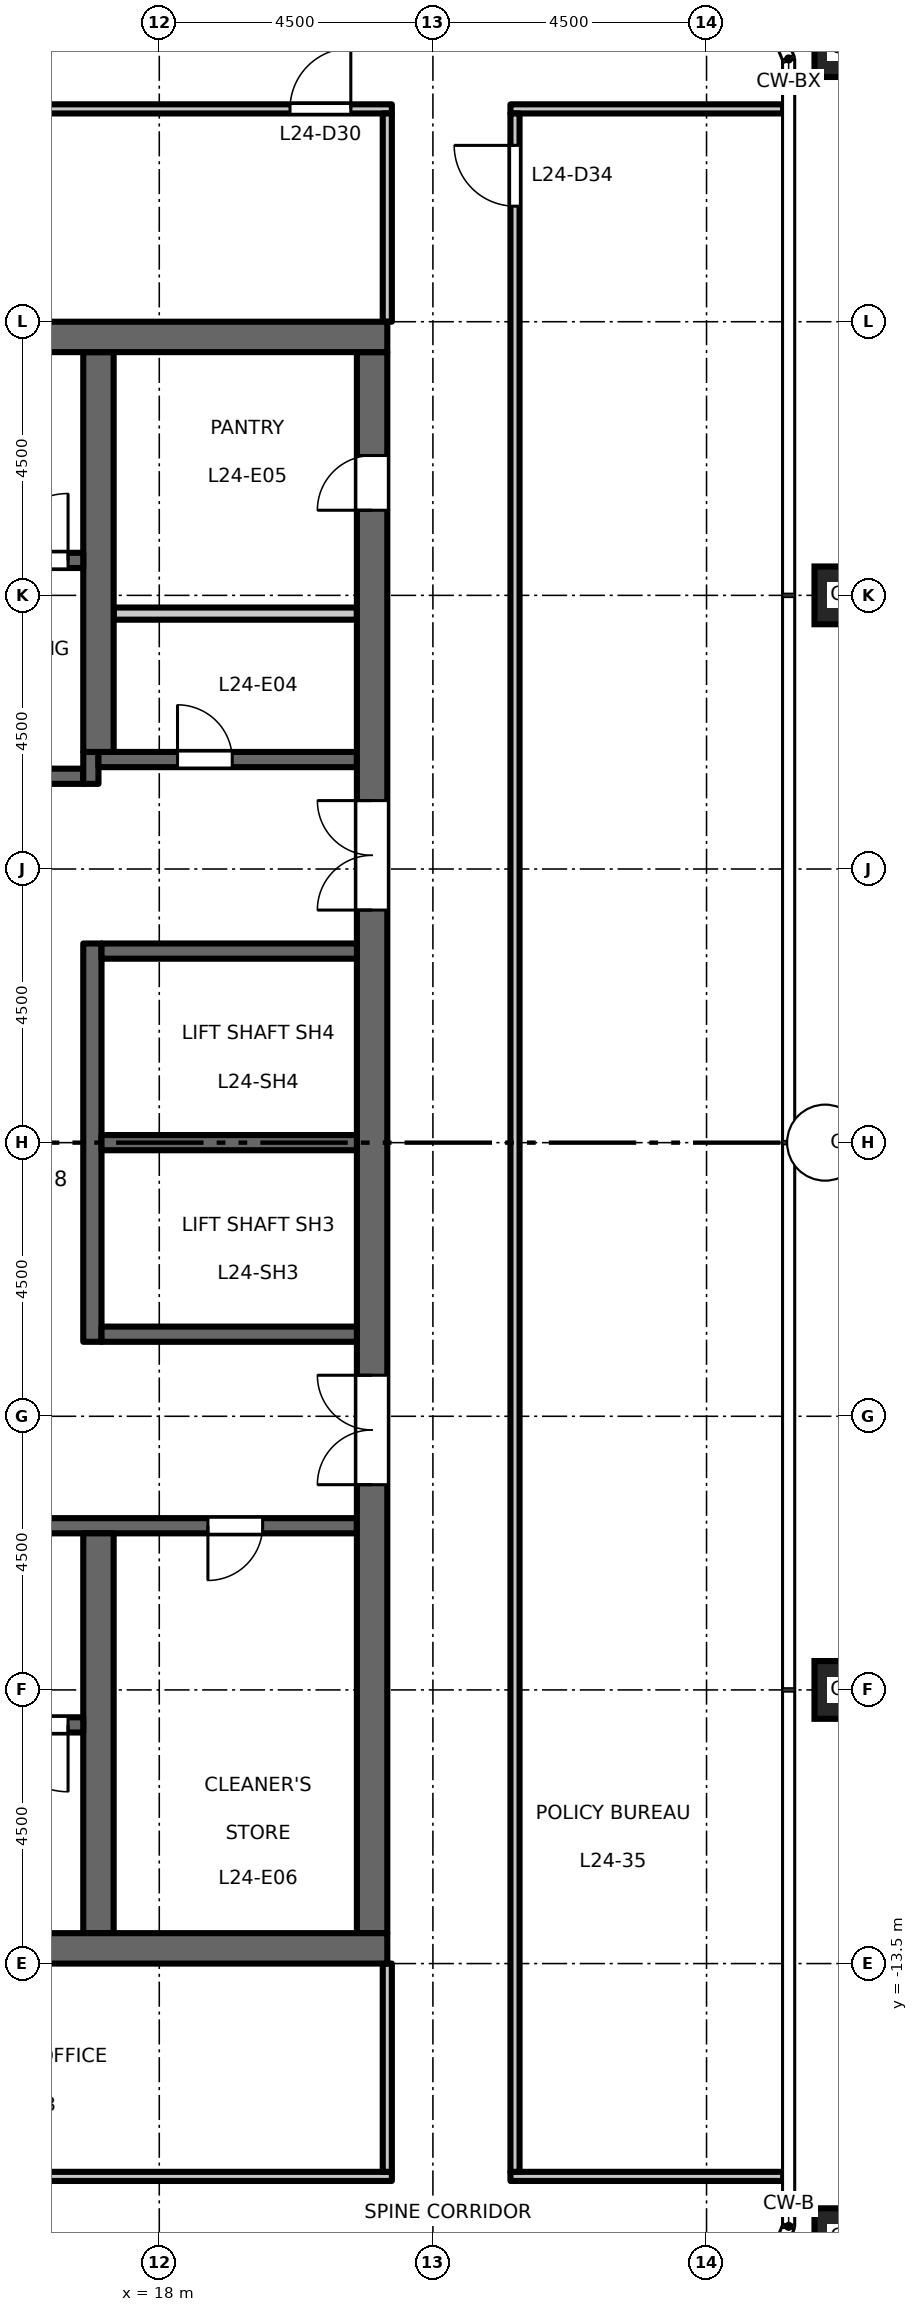
"""IFC4 building model, lengths in metres.
Left out: names, types, materials, properties, quantities, classifications, styles, units other than length and angle.
Written with IfcOpenShell. Run it as: python <this file> out.ifc"""

import sys

from ifc_helpers import new_model, si_unit, direction, frame, frame_2d, origin, origin_2d, place, context, subcontext, project, spatial, rectangle, hollow_rectangle, extrude, element, fill, save


model = new_model("IFC4")
c1 = context("Model", 3, precision=1e-05, world=origin(), true_north=direction((0.0, 1.0)))
c2 = subcontext(c1, "Body", "Model", "MODEL_VIEW")
j1 = project(units=[si_unit("LENGTHUNIT", "METRE"), si_unit("PLANEANGLEUNIT", "RADIAN")], contexts=[c1])
p1 = place(None, origin())
s1 = spatial("IfcSite", under=j1, at=p1, CompositionType="ELEMENT")
p2 = place(p1, origin())
s2 = spatial("IfcBuilding", under=s1, at=p2, CompositionType="ELEMENT")
p3 = place(p2, frame((0.0, 0.0, 113.7)))
s3 = spatial("IfcBuildingStorey", under=s2, at=p3, CompositionType="ELEMENT", Elevation=113.7)
for number, where, z_axis, x_axis in (
    (1, (29.25, -18.0, 0.0), (0.0, 0.0, 1.0), (1.0, 0.0, 0.0)),
    (2, (29.25, -9.0, 0.0), (0.0, 0.0, 1.0), (1.0, 0.0, 0.0)),
    (3, (29.25, 0.0, 0.0), (0.0, 0.0, 1.0), (1.0, 0.0, 0.0)),
    (4, (29.25, 9.0, 0.0), (0.0, 0.0, 1.0), (1.0, 0.0, 0.0)),
    (5, (29.25, 18.0, 0.0), (0.0, 0.0, 1.0), (1.0, 0.0, 0.0)),
):
    element("IfcColumn", number, at=place(p3, frame(where, z_axis=z_axis, x_axis=x_axis)), inside=s3, PredefinedType="COLUMN", context=c2, shape_type="SweptSolid", body=[
        extrude(hollow_rectangle(XDim=0.95, YDim=0.95, WallThickness=0.055, at=origin_2d()), origin(), (0.0, 0.0, 1.0), 4.5),
    ])
p4 = place(p3, frame((12.15, 6.025, 0.0), z_axis=(0.0, 0.0, 1.0), x_axis=(1.0, 0.0, 0.0)))
e6 = element("IfcWall", 6, at=p4, inside=s3, PredefinedType="SHEAR", context=c2, shape_type="SweptSolid", body=[
    extrude(rectangle(XDim=4.6, YDim=0.25, at=frame_2d((2.3, 0.0))), origin(), (0.0, 0.0, 1.0), 4.35),
])
p5 = place(p4, frame((1.8, 0.0, 0.0)))
e7 = element("IfcOpeningElement", 7, at=p5, cuts=e6, PredefinedType="OPENING", context=c2, shape_type="SweptSolid", body=[
    extrude(rectangle(XDim=1.0, YDim=2.1, at=frame_2d((0.5, 1.05))), frame((0.0, 0.135, 0.0), z_axis=(0.0, -1.0, 0.0), x_axis=(1.0, 0.0, 0.0)), (0.0, 0.0, 1.0), 0.27),
])
p6 = place(p3, frame((16.875, 5.9, 0.0), z_axis=(0.0, 0.0, 1.0), x_axis=(0.0, 1.0, 0.0)))
e8 = element("IfcWall", 8, at=p6, inside=s3, PredefinedType="SHEAR", context=c2, shape_type="SweptSolid", body=[
    extrude(rectangle(XDim=0.525, YDim=0.25, at=frame_2d((0.263, 0.0))), origin(), (0.0, 0.0, 1.0), 4.35),
])
p7 = place(p3, frame((17.0, 6.3, 0.0), z_axis=(0.0, 0.0, 1.0), x_axis=(1.0, 0.0, 0.0)))
e9 = element("IfcWall", 9, at=p7, inside=s3, PredefinedType="SHEAR", context=c2, shape_type="SweptSolid", body=[
    extrude(rectangle(XDim=4.25, YDim=0.25, at=frame_2d((2.125, 0.0))), origin(), (0.0, 0.0, 1.0), 4.35),
])
p8 = place(p7, frame((1.3, 0.0, 0.0)))
e10 = element("IfcOpeningElement", 10, at=p8, cuts=e9, PredefinedType="OPENING", context=c2, shape_type="SweptSolid", body=[
    extrude(rectangle(XDim=0.9, YDim=2.1, at=frame_2d((0.45, 1.05))), frame((0.0, 0.135, 0.0), z_axis=(0.0, -1.0, 0.0), x_axis=(1.0, 0.0, 0.0)), (0.0, 0.0, 1.0), 0.27),
])
p9 = place(p3, frame((12.15, -6.3, 0.0), z_axis=(0.0, 0.0, 1.0), x_axis=(1.0, 0.0, 0.0)))
e11 = element("IfcWall", 11, at=p9, inside=s3, PredefinedType="SHEAR", context=c2, shape_type="SweptSolid", body=[
    extrude(rectangle(XDim=9.1, YDim=0.25, at=frame_2d((4.55, 0.0))), origin(), (0.0, 0.0, 1.0), 4.35),
])
p10 = place(p9, frame((1.8, 0.0, 0.0)))
e12 = element("IfcOpeningElement", 12, at=p10, cuts=e11, PredefinedType="OPENING", context=c2, shape_type="SweptSolid", body=[
    extrude(rectangle(XDim=1.0, YDim=2.1, at=frame_2d((0.5, 1.05))), frame((0.0, 0.135, 0.0), z_axis=(0.0, -1.0, 0.0), x_axis=(1.0, 0.0, 0.0)), (0.0, 0.0, 1.0), 0.27),
])
p11 = place(p9, frame((6.65, 0.0, 0.0)))
e13 = element("IfcOpeningElement", 13, at=p11, cuts=e11, PredefinedType="OPENING", context=c2, shape_type="SweptSolid", body=[
    extrude(rectangle(XDim=0.9, YDim=2.1, at=frame_2d((0.45, 1.05))), frame((0.0, 0.135, 0.0), z_axis=(0.0, -1.0, 0.0), x_axis=(1.0, 0.0, 0.0)), (0.0, 0.0, 1.0), 0.27),
])
p12 = place(p3, frame((21.5, -13.0, 0.0), z_axis=(0.0, 0.0, 1.0), x_axis=(0.0, 1.0, 0.0)))
e14 = element("IfcWall", 14, at=p12, inside=s3, PredefinedType="SHEAR", context=c2, shape_type="SweptSolid", body=[
    extrude(rectangle(XDim=26.0, YDim=0.5, at=frame_2d((13.0, 0.0))), origin(), (0.0, 0.0, 1.0), 4.35),
])
p13 = place(p12, frame((16.825, 0.0, 0.0)))
e15 = element("IfcOpeningElement", 15, at=p13, cuts=e14, PredefinedType="OPENING", context=c2, shape_type="SweptSolid", body=[
    extrude(rectangle(XDim=1.8, YDim=2.1, at=frame_2d((0.9, 1.05))), frame((0.0, 0.26, 0.0), z_axis=(0.0, -1.0, 0.0), x_axis=(1.0, 0.0, 0.0)), (0.0, 0.0, 1.0), 0.52),
])
p14 = place(p12, frame((7.375, 0.0, 0.0)))
e16 = element("IfcOpeningElement", 16, at=p14, cuts=e14, PredefinedType="OPENING", context=c2, shape_type="SweptSolid", body=[
    extrude(rectangle(XDim=1.8, YDim=2.1, at=frame_2d((0.9, 1.05))), frame((0.0, 0.26, 0.0), z_axis=(0.0, -1.0, 0.0), x_axis=(1.0, 0.0, 0.0)), (0.0, 0.0, 1.0), 0.52),
])
p15 = place(p12, frame((23.4, 0.0, 0.0)))
e17 = element("IfcOpeningElement", 17, at=p15, cuts=e14, PredefinedType="OPENING", context=c2, shape_type="SweptSolid", body=[
    extrude(rectangle(XDim=0.9, YDim=2.1, at=frame_2d((0.45, 1.05))), frame((0.0, 0.26, 0.0), z_axis=(0.0, -1.0, 0.0), x_axis=(1.0, 0.0, 0.0)), (0.0, 0.0, 1.0), 0.52),
])
p16 = place(p3, frame((17.25, 8.7, 0.0), z_axis=(0.0, 0.0, 1.0), x_axis=(1.0, 0.0, 0.0)))
e18 = element("IfcWall", 18, at=p16, inside=s3, PredefinedType="PARTITIONING", context=c2, shape_type="SweptSolid", body=[
    extrude(rectangle(XDim=4.0, YDim=0.2, at=frame_2d((2.0, 0.0))), origin(), (0.0, 0.0, 1.0), 4.35),
])
p17 = place(p3, frame((16.9, -3.275, 0.0), z_axis=(0.0, 0.0, 1.0), x_axis=(0.0, 1.0, 0.0)))
e19 = element("IfcWall", 19, at=p17, inside=s3, PredefinedType="SHEAR", context=c2, shape_type="SweptSolid", body=[
    extrude(rectangle(XDim=6.55, YDim=0.3, at=frame_2d((3.275, 0.0))), origin(), (0.0, 0.0, 1.0), 4.35),
])
for number, where, z_axis, x_axis in (
    (20, (17.05, 0.0, 0.0), (0.0, 0.0, 1.0), (1.0, 0.0, 0.0)),
    (21, (17.05, 3.15, 0.0), (0.0, 0.0, 1.0), (1.0, 0.0, 0.0)),
    (22, (17.05, -3.15, 0.0), (0.0, 0.0, 1.0), (1.0, 0.0, 0.0)),
):
    element("IfcWall", number, at=place(p3, frame(where, z_axis=z_axis, x_axis=x_axis)), inside=s3, PredefinedType="SHEAR", context=c2, shape_type="SweptSolid", body=[
        extrude(rectangle(XDim=4.2, YDim=0.25, at=frame_2d((2.1, 0.0))), origin(), (0.0, 0.0, 1.0), 4.35),
    ])
for number, where, z_axis, x_axis in (
    (23, (17.0, 6.425, 0.0), (0.0, 0.0, 1.0), (0.0, 1.0, 0.0)),
    (24, (17.0, -13.0, 0.0), (0.0, 0.0, 1.0), (0.0, 1.0, 0.0)),
):
    element("IfcWall", number, at=place(p3, frame(where, z_axis=z_axis, x_axis=x_axis)), inside=s3, PredefinedType="SHEAR", context=c2, shape_type="SweptSolid", body=[
        extrude(rectangle(XDim=6.575, YDim=0.5, at=frame_2d((3.288, 0.0))), origin(), (0.0, 0.0, 1.0), 4.35),
    ])
p18 = place(p3, frame((8.75, 9.575, 0.0), z_axis=(0.0, 0.0, 1.0), x_axis=(1.0, 0.0, 0.0)))
e25 = element("IfcWall", 25, at=p18, inside=s3, PredefinedType="SHEAR", context=c2, shape_type="SweptSolid", body=[
    extrude(rectangle(XDim=8.0, YDim=0.25, at=frame_2d((4.0, 0.0))), origin(), (0.0, 0.0, 1.0), 4.35),
])
p19 = place(p18, frame((6.65, 0.0, 0.0)))
e26 = element("IfcOpeningElement", 26, at=p19, cuts=e25, PredefinedType="OPENING", context=c2, shape_type="SweptSolid", body=[
    extrude(rectangle(XDim=1.1, YDim=2.1, at=frame_2d((0.55, 1.05))), frame((0.0, 0.135, 0.0), z_axis=(0.0, -1.0, 0.0), x_axis=(1.0, 0.0, 0.0)), (0.0, 0.0, 1.0), 0.27),
])
p20 = place(p3, frame((8.75, -9.575, 0.0), z_axis=(0.0, 0.0, 1.0), x_axis=(1.0, 0.0, 0.0)))
e27 = element("IfcWall", 27, at=p20, inside=s3, PredefinedType="SHEAR", context=c2, shape_type="SweptSolid", body=[
    extrude(rectangle(XDim=8.0, YDim=0.25, at=frame_2d((4.0, 0.0))), origin(), (0.0, 0.0, 1.0), 4.35),
])
p21 = place(p20, frame((6.65, 0.0, 0.0)))
e28 = element("IfcOpeningElement", 28, at=p21, cuts=e27, PredefinedType="OPENING", context=c2, shape_type="SweptSolid", body=[
    extrude(rectangle(XDim=1.1, YDim=2.1, at=frame_2d((0.55, 1.05))), frame((0.0, 0.135, 0.0), z_axis=(0.0, -1.0, 0.0), x_axis=(1.0, 0.0, 0.0)), (0.0, 0.0, 1.0), 0.27),
])
for number, where, z_axis, x_axis in (
    (29, (8.25, 13.25, 0.0), (0.0, 0.0, 1.0), (1.0, 0.0, 0.0)),
    (30, (8.25, -13.25, 0.0), (0.0, 0.0, 1.0), (1.0, 0.0, 0.0)),
):
    element("IfcWall", number, at=place(p3, frame(where, z_axis=z_axis, x_axis=x_axis)), inside=s3, PredefinedType="SHEAR", context=c2, shape_type="SweptSolid", body=[
        extrude(rectangle(XDim=13.5, YDim=0.5, at=frame_2d((6.75, 0.0))), origin(), (0.0, 0.0, 1.0), 4.35),
    ])
p22 = place(p3, frame((-21.825, -17.0, 0.0), z_axis=(0.0, 0.0, 1.0), x_axis=(1.0, 0.0, 0.0)))
e31 = element("IfcWall", 31, at=p22, inside=s3, PredefinedType="PARTITIONING", context=c2, shape_type="SweptSolid", body=[
    extrude(rectangle(XDim=43.65, YDim=0.15, at=frame_2d((21.825, 0.0))), origin(), (0.0, 0.0, 1.0), 4.35),
])
p23 = place(p22, frame((14.175, 0.0, 0.0)))
e32 = element("IfcOpeningElement", 32, at=p23, cuts=e31, PredefinedType="OPENING", context=c2, shape_type="SweptSolid", body=[
    extrude(rectangle(XDim=1.0, YDim=2.1, at=frame_2d((0.5, 1.05))), frame((0.0, 0.085, 0.0), z_axis=(0.0, -1.0, 0.0), x_axis=(1.0, 0.0, 0.0)), (0.0, 0.0, 1.0), 0.17),
])
p24 = place(p22, frame((11.925, 0.0, 0.0)))
e33 = element("IfcOpeningElement", 33, at=p24, cuts=e31, PredefinedType="OPENING", context=c2, shape_type="SweptSolid", body=[
    extrude(rectangle(XDim=1.0, YDim=2.1, at=frame_2d((0.5, 1.05))), frame((0.0, 0.085, 0.0), z_axis=(0.0, -1.0, 0.0), x_axis=(1.0, 0.0, 0.0)), (0.0, 0.0, 1.0), 0.17),
])
p25 = place(p22, frame((30.675, 0.0, 0.0)))
e34 = element("IfcOpeningElement", 34, at=p25, cuts=e31, PredefinedType="OPENING", context=c2, shape_type="SweptSolid", body=[
    extrude(rectangle(XDim=1.0, YDim=2.1, at=frame_2d((0.5, 1.05))), frame((0.0, 0.085, 0.0), z_axis=(0.0, -1.0, 0.0), x_axis=(1.0, 0.0, 0.0)), (0.0, 0.0, 1.0), 0.17),
])
p26 = place(p3, frame((23.775, -17.0, 0.0), z_axis=(0.0, 0.0, 1.0), x_axis=(1.0, 0.0, 0.0)))
e35 = element("IfcWall", 35, at=p26, inside=s3, PredefinedType="PARTITIONING", context=c2, shape_type="SweptSolid", body=[
    extrude(rectangle(XDim=4.485, YDim=0.15, at=frame_2d((2.243, 0.0))), origin(), (0.0, 0.0, 1.0), 4.35),
])
p27 = place(p3, frame((-21.825, 17.0, 0.0), z_axis=(0.0, 0.0, 1.0), x_axis=(1.0, 0.0, 0.0)))
e36 = element("IfcWall", 36, at=p27, inside=s3, PredefinedType="PARTITIONING", context=c2, shape_type="SweptSolid", body=[
    extrude(rectangle(XDim=43.65, YDim=0.15, at=frame_2d((21.825, 0.0))), origin(), (0.0, 0.0, 1.0), 4.35),
])
p28 = place(p27, frame((20.225, 0.0, 0.0)))
e37 = element("IfcOpeningElement", 37, at=p28, cuts=e36, PredefinedType="OPENING", context=c2, shape_type="SweptSolid", body=[
    extrude(rectangle(XDim=1.0, YDim=2.1, at=frame_2d((0.5, 1.05))), frame((0.0, 0.085, 0.0), z_axis=(0.0, -1.0, 0.0), x_axis=(1.0, 0.0, 0.0)), (0.0, 0.0, 1.0), 0.17),
])
p29 = place(p27, frame((22.475, 0.0, 0.0)))
e38 = element("IfcOpeningElement", 38, at=p29, cuts=e36, PredefinedType="OPENING", context=c2, shape_type="SweptSolid", body=[
    extrude(rectangle(XDim=1.0, YDim=2.1, at=frame_2d((0.5, 1.05))), frame((0.0, 0.085, 0.0), z_axis=(0.0, -1.0, 0.0), x_axis=(1.0, 0.0, 0.0)), (0.0, 0.0, 1.0), 0.17),
])
p30 = place(p27, frame((0.725, 0.0, 0.0)))
e39 = element("IfcOpeningElement", 39, at=p30, cuts=e36, PredefinedType="OPENING", context=c2, shape_type="SweptSolid", body=[
    extrude(rectangle(XDim=1.0, YDim=2.1, at=frame_2d((0.5, 1.05))), frame((0.0, 0.085, 0.0), z_axis=(0.0, -1.0, 0.0), x_axis=(1.0, 0.0, 0.0)), (0.0, 0.0, 1.0), 0.17),
])
p31 = place(p27, frame((41.975, 0.0, 0.0)))
e40 = element("IfcOpeningElement", 40, at=p31, cuts=e36, PredefinedType="OPENING", context=c2, shape_type="SweptSolid", body=[
    extrude(rectangle(XDim=1.0, YDim=2.1, at=frame_2d((0.5, 1.05))), frame((0.0, 0.085, 0.0), z_axis=(0.0, -1.0, 0.0), x_axis=(1.0, 0.0, 0.0)), (0.0, 0.0, 1.0), 0.17),
])
p32 = place(p3, frame((23.775, 17.0, 0.0), z_axis=(0.0, 0.0, 1.0), x_axis=(1.0, 0.0, 0.0)))
e41 = element("IfcWall", 41, at=p32, inside=s3, PredefinedType="PARTITIONING", context=c2, shape_type="SweptSolid", body=[
    extrude(rectangle(XDim=4.485, YDim=0.15, at=frame_2d((2.243, 0.0))), origin(), (0.0, 0.0, 1.0), 4.35),
])
for number, where, z_axis, x_axis in (
    (42, (21.75, -16.925, 0.0), (0.0, 0.0, 1.0), (0.0, 1.0, 0.0)),
    (43, (21.75, 13.5, 0.0), (0.0, 0.0, 1.0), (0.0, 1.0, 0.0)),
):
    element("IfcWall", number, at=place(p3, frame(where, z_axis=z_axis, x_axis=x_axis)), inside=s3, PredefinedType="PARTITIONING", context=c2, shape_type="SweptSolid", body=[
        extrude(rectangle(XDim=3.425, YDim=0.15, at=frame_2d((1.712, 0.0))), origin(), (0.0, 0.0, 1.0), 4.35),
    ])
p33 = place(p3, frame((23.85, -16.925, 0.0), z_axis=(0.0, 0.0, 1.0), x_axis=(0.0, 1.0, 0.0)))
e44 = element("IfcWall", 44, at=p33, inside=s3, PredefinedType="PARTITIONING", context=c2, shape_type="SweptSolid", body=[
    extrude(rectangle(XDim=33.85, YDim=0.15, at=frame_2d((16.925, 0.0))), origin(), (0.0, 0.0, 1.0), 4.35),
])
p34 = place(p33, frame((32.325, 0.0, 0.0)))
e45 = element("IfcOpeningElement", 45, at=p34, cuts=e44, PredefinedType="OPENING", context=c2, shape_type="SweptSolid", body=[
    extrude(rectangle(XDim=1.0, YDim=2.1, at=frame_2d((0.5, 1.05))), frame((0.0, 0.085, 0.0), z_axis=(0.0, -1.0, 0.0), x_axis=(1.0, 0.0, 0.0)), (0.0, 0.0, 1.0), 0.17),
])
p35 = place(p19, origin())
e46 = element("IfcDoor", 46, at=p35, inside=s3, OperationType="SINGLE_SWING_LEFT", PredefinedType="DOOR", context=c2, shape_type="SweptSolid", body=[
    extrude(rectangle(XDim=1.1, YDim=2.1, at=frame_2d((0.55, 1.05))), frame((0.0, 0.025, 0.0), z_axis=(0.0, -1.0, 0.0), x_axis=(1.0, 0.0, 0.0)), (0.0, 0.0, 1.0), 0.05),
])
fill(e26, e46)
p36 = place(p21, origin())
e47 = element("IfcDoor", 47, at=p36, inside=s3, OperationType="SINGLE_SWING_RIGHT", PredefinedType="DOOR", context=c2, shape_type="SweptSolid", body=[
    extrude(rectangle(XDim=1.1, YDim=2.1, at=frame_2d((0.55, 1.05))), frame((0.0, 0.025, 0.0), z_axis=(0.0, -1.0, 0.0), x_axis=(1.0, 0.0, 0.0)), (0.0, 0.0, 1.0), 0.05),
])
fill(e28, e47)
p37 = place(p13, origin())
e48 = element("IfcDoor", 48, at=p37, inside=s3, OperationType="DOUBLE_DOOR_DOUBLE_SWING", PredefinedType="DOOR", context=c2, shape_type="SweptSolid", body=[
    extrude(rectangle(XDim=1.8, YDim=2.1, at=frame_2d((0.9, 1.05))), frame((0.0, 0.025, 0.0), z_axis=(0.0, -1.0, 0.0), x_axis=(1.0, 0.0, 0.0)), (0.0, 0.0, 1.0), 0.05),
])
fill(e15, e48)
p38 = place(p14, origin())
e49 = element("IfcDoor", 49, at=p38, inside=s3, OperationType="DOUBLE_DOOR_DOUBLE_SWING", PredefinedType="DOOR", context=c2, shape_type="SweptSolid", body=[
    extrude(rectangle(XDim=1.8, YDim=2.1, at=frame_2d((0.9, 1.05))), frame((0.0, 0.025, 0.0), z_axis=(0.0, -1.0, 0.0), x_axis=(1.0, 0.0, 0.0)), (0.0, 0.0, 1.0), 0.05),
])
fill(e16, e49)
p39 = place(p8, origin())
e50 = element("IfcDoor", 50, at=p39, inside=s3, OperationType="SINGLE_SWING_RIGHT", PredefinedType="DOOR", context=c2, shape_type="SweptSolid", body=[
    extrude(rectangle(XDim=0.9, YDim=2.1, at=frame_2d((0.45, 1.05))), frame((0.0, 0.025, 0.0), z_axis=(0.0, -1.0, 0.0), x_axis=(1.0, 0.0, 0.0)), (0.0, 0.0, 1.0), 0.05),
])
fill(e10, e50)
p40 = place(p15, origin())
e51 = element("IfcDoor", 51, at=p40, inside=s3, OperationType="SINGLE_SWING_RIGHT", PredefinedType="DOOR", context=c2, shape_type="SweptSolid", body=[
    extrude(rectangle(XDim=0.9, YDim=2.1, at=frame_2d((0.45, 1.05))), frame((0.0, 0.025, 0.0), z_axis=(0.0, -1.0, 0.0), x_axis=(1.0, 0.0, 0.0)), (0.0, 0.0, 1.0), 0.05),
])
fill(e17, e51)
p41 = place(p11, origin())
e52 = element("IfcDoor", 52, at=p41, inside=s3, OperationType="SINGLE_SWING_LEFT", PredefinedType="DOOR", context=c2, shape_type="SweptSolid", body=[
    extrude(rectangle(XDim=0.9, YDim=2.1, at=frame_2d((0.45, 1.05))), frame((0.0, 0.025, 0.0), z_axis=(0.0, -1.0, 0.0), x_axis=(1.0, 0.0, 0.0)), (0.0, 0.0, 1.0), 0.05),
])
fill(e13, e52)
p42 = place(p31, origin())
e53 = element("IfcDoor", 53, at=p42, inside=s3, OperationType="SINGLE_SWING_RIGHT", PredefinedType="DOOR", context=c2, shape_type="SweptSolid", body=[
    extrude(rectangle(XDim=1.0, YDim=2.1, at=frame_2d((0.5, 1.05))), frame((0.0, 0.025, 0.0), z_axis=(0.0, -1.0, 0.0), x_axis=(1.0, 0.0, 0.0)), (0.0, 0.0, 1.0), 0.05),
])
fill(e40, e53)
p43 = place(p34, origin())
e54 = element("IfcDoor", 54, at=p43, inside=s3, OperationType="SINGLE_SWING_RIGHT", PredefinedType="DOOR", context=c2, shape_type="SweptSolid", body=[
    extrude(rectangle(XDim=1.0, YDim=2.1, at=frame_2d((0.5, 1.05))), frame((0.0, 0.025, 0.0), z_axis=(0.0, -1.0, 0.0), x_axis=(1.0, 0.0, 0.0)), (0.0, 0.0, 1.0), 0.05),
])
fill(e45, e54)
save(model, sys.argv[1])
